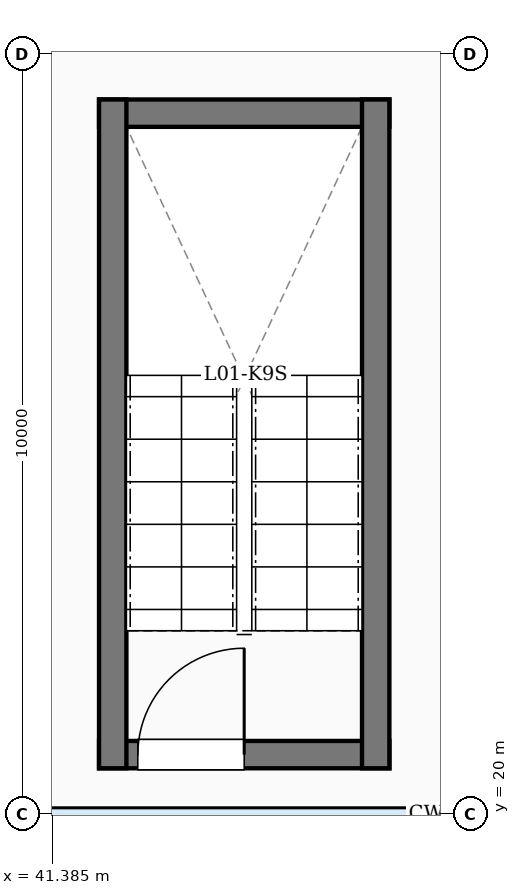
"""IFC4 building model, lengths in metres.
Left out: names, types, materials, properties, quantities, classifications, styles, units other than length and angle.
Written with IfcOpenShell. Run it as: python <this file> out.ifc"""

import sys

from ifc_helpers import new_model, si_unit, direction, frame, frame_2d, origin, place, context, subcontext, project, spatial, rectangle, extrude, element, fill, save


model = new_model("IFC4")
c1 = context("Model", 3, precision=1e-05, world=origin(), true_north=direction((0.0, 1.0)))
c2 = subcontext(c1, "Body", "Model", "MODEL_VIEW")
j1 = project(units=[si_unit("LENGTHUNIT", "METRE"), si_unit("PLANEANGLEUNIT", "RADIAN")], contexts=[c1])
p1 = place(None, origin())
s1 = spatial("IfcSite", under=j1, at=p1, CompositionType="ELEMENT")
p2 = place(p1, origin())
s2 = spatial("IfcBuilding", under=s1, at=p2, CompositionType="ELEMENT")
p3 = place(p2, frame((0.0, 0.0, 5.4)))
s3 = spatial("IfcBuildingStorey", under=s2, at=p3, CompositionType="ELEMENT", Elevation=5.4)
p4 = place(p3, frame((42.0, 20.78, 0.0), z_axis=(0.0, 0.0, 1.0), x_axis=(1.0, 0.0, 0.0)))
e1 = element("IfcWall", 1, at=p4, inside=s3, PredefinedType="SHEAR", context=c2, shape_type="SweptSolid", body=[
    extrude(rectangle(XDim=3.82, YDim=0.36, at=frame_2d((1.91, 0.0))), origin(), (0.0, 0.0, 1.0), 4.8),
])
p5 = place(p4, frame((0.51, 0.0, 0.0)))
e2 = element("IfcOpeningElement", 2, at=p5, cuts=e1, PredefinedType="OPENING", context=c2, shape_type="SweptSolid", body=[
    extrude(rectangle(XDim=1.4, YDim=2.35, at=frame_2d((0.7, 1.175))), frame((0.0, 0.19, 0.0), z_axis=(0.0, -1.0, 0.0), x_axis=(1.0, 0.0, 0.0)), (0.0, 0.0, 1.0), 0.38),
])
p6 = place(p3, frame((42.0, 29.22, 0.0), z_axis=(0.0, 0.0, 1.0), x_axis=(1.0, 0.0, 0.0)))
e3 = element("IfcWall", 3, at=p6, inside=s3, PredefinedType="SHEAR", context=c2, shape_type="SweptSolid", body=[
    extrude(rectangle(XDim=3.82, YDim=0.36, at=frame_2d((1.91, 0.0))), origin(), (0.0, 0.0, 1.0), 4.8),
])
for number, where, z_axis, x_axis in (
    (4, (42.18, 20.6, 0.0), (0.0, 0.0, 1.0), (0.0, 1.0, 0.0)),
    (5, (45.64, 20.6, 0.0), (0.0, 0.0, 1.0), (0.0, 1.0, 0.0)),
):
    element("IfcWall", number, at=place(p3, frame(where, z_axis=z_axis, x_axis=x_axis)), inside=s3, PredefinedType="SHEAR", context=c2, shape_type="SweptSolid", body=[
        extrude(rectangle(XDim=8.8, YDim=0.36, at=frame_2d((4.4, 0.0))), origin(), (0.0, 0.0, 1.0), 4.8),
    ])
p7 = place(p5, origin())
e6 = element("IfcDoor", 6, at=p7, inside=s3, OperationType="SINGLE_SWING_RIGHT", PredefinedType="DOOR", context=c2, shape_type="SweptSolid", body=[
    extrude(rectangle(XDim=1.4, YDim=2.35, at=frame_2d((0.7, 1.175))), frame((0.0, 0.025, 0.0), z_axis=(0.0, -1.0, 0.0), x_axis=(1.0, 0.0, 0.0)), (0.0, 0.0, 1.0), 0.05),
])
fill(e2, e6)
save(model, sys.argv[1])
